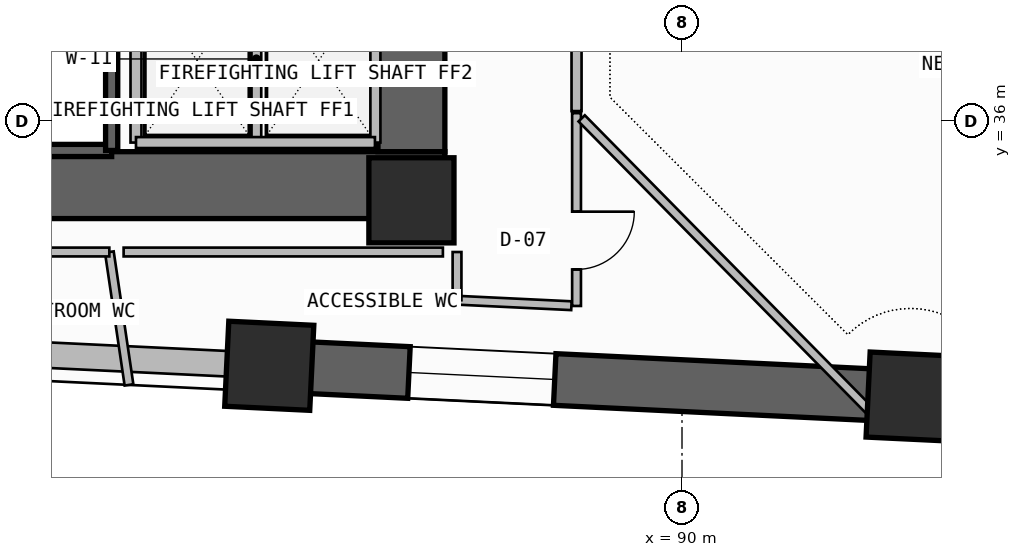
"""IFC4 building model, lengths in metres.
Left out: names, types, materials, properties, quantities, classifications, styles, units other than length and angle.
Written with IfcOpenShell. Run it as: python <this file> out.ifc"""

import sys

from ifc_helpers import new_model, si_unit, direction, frame, frame_2d, origin, origin_2d, place, context, subcontext, project, spatial, rectangle, extrude, element, fill, save


model = new_model("IFC4")
c1 = context("Model", 3, precision=1e-05, world=origin(), true_north=direction((0.0, 1.0)))
c2 = subcontext(c1, "Body", "Model", "MODEL_VIEW")
j1 = project(units=[si_unit("LENGTHUNIT", "METRE"), si_unit("PLANEANGLEUNIT", "RADIAN")], contexts=[c1])
p1 = place(None, origin())
s1 = spatial("IfcSite", under=j1, at=p1, CompositionType="ELEMENT")
p2 = place(p1, origin())
s2 = spatial("IfcBuilding", under=s1, at=p2, CompositionType="ELEMENT")
p3 = place(p2, frame((0.0, 0.0, 33.9)))
s3 = spatial("IfcBuildingStorey", under=s2, at=p3, CompositionType="ELEMENT", Elevation=33.9)
p4 = place(p3, frame((71.8, 34.95, -0.2), z_axis=(0.0, 0.0, 1.0), x_axis=(1.0, 0.0, 0.0)))
e1 = element("IfcWall", 1, at=p4, inside=s3, PredefinedType="SHEAR", context=c2, shape_type="SweptSolid", body=[
    extrude(rectangle(XDim=14.3, YDim=1.1, at=frame_2d((7.15, 0.0))), origin(), (0.0, 0.0, 1.0), 3.54),
])
p5 = place(p3, frame((85.55, 35.5, -0.2), z_axis=(0.0, 0.0, 1.0), x_axis=(0.0, 1.0, 0.0)))
e2 = element("IfcWall", 2, at=p5, inside=s3, PredefinedType="SHEAR", context=c2, shape_type="SweptSolid", body=[
    extrude(rectangle(XDim=3.3, YDim=1.1, at=frame_2d((1.65, 0.0))), origin(), (0.0, 0.0, 1.0), 3.54),
])
for number, where, z_axis, x_axis in (
    (3, (85.55, 34.7, 0.0), (0.0, 0.0, 1.0), (1.0, 0.0, 0.0)),
    (4, (83.212, 31.979, 0.0), (0.0, 0.0, 1.0), (-0.999, 0.048, 0.0)),
    (5, (93.76, 31.472, 0.0), (0.0, 0.0, 1.0), (-0.999, 0.048, 0.0)),
):
    element("IfcColumn", number, at=place(p3, frame(where, z_axis=z_axis, x_axis=x_axis)), inside=s3, PredefinedType="COLUMN", context=c2, shape_type="SweptSolid", body=[
        extrude(rectangle(XDim=1.4, YDim=1.4, at=origin_2d()), origin(), (0.0, 0.0, 1.0), 3.6),
    ])
p6 = place(p3, frame((65.281, 32.841, 0.0), z_axis=(0.0, 0.0, 1.0), x_axis=(0.998848298084, -0.047979968897, 0.0)))
e6 = element("IfcWall", 6, at=p6, inside=s3, PredefinedType="SOLIDWALL", context=c2, shape_type="SweptSolid", body=[
    extrude(rectangle(XDim=17.952, YDim=0.42, at=frame_2d((8.976, 0.0))), origin(), (0.0, 0.0, 1.0), 2.325),
])
p7 = place(p6, frame((0.9, 0.0, 1.2)))
e7 = element("IfcOpeningElement", 7, at=p7, cuts=e6, PredefinedType="OPENING", context=c2, shape_type="SweptSolid", body=[
    extrude(rectangle(XDim=2.4, YDim=0.9, at=frame_2d((1.2, 0.45))), frame((0.0, 0.22, 0.0), z_axis=(0.0, -1.0, 0.0), x_axis=(1.0, 0.0, 0.0)), (0.0, 0.0, 1.0), 0.44),
])
p8 = place(p3, frame((83.212, 31.979, -0.2), z_axis=(0.0, 0.0, 1.0), x_axis=(0.998848235141, -0.047981279227, 0.0)))
e8 = element("IfcWall", 8, at=p8, inside=s3, PredefinedType="SHEAR", context=c2, shape_type="SweptSolid", body=[
    extrude(rectangle(XDim=27.456, YDim=0.85, at=frame_2d((13.728, 0.0))), origin(), (0.0, 0.0, 1.0), 3.54),
])
p9 = place(p8, frame((2.3, 0.0, 1.2)))
e9 = element("IfcOpeningElement", 9, at=p9, cuts=e8, PredefinedType="OPENING", context=c2, shape_type="SweptSolid", body=[
    extrude(rectangle(XDim=2.4, YDim=0.9, at=frame_2d((1.2, 0.45))), frame((0.0, 0.435, 0.0), z_axis=(0.0, -1.0, 0.0), x_axis=(1.0, 0.0, 0.0)), (0.0, 0.0, 1.0), 0.87),
])
p10 = place(p3, frame((72.92, 35.52, -0.2), z_axis=(0.0, 0.0, 1.0), x_axis=(1.0, 0.0, 0.0)))
e10 = element("IfcWall", 10, at=p10, inside=s3, PredefinedType="SOLIDWALL", context=c2, shape_type="SweptSolid", body=[
    extrude(rectangle(XDim=7.7, YDim=0.2, at=frame_2d((3.85, 0.0))), origin(), (0.0, 0.0, 1.0), 3.54),
])
p11 = place(p3, frame((80.62, 35.52, -0.2), z_axis=(0.0, 0.0, 1.0), x_axis=(0.0, 1.0, 0.0)))
e11 = element("IfcWall", 11, at=p11, inside=s3, PredefinedType="SOLIDWALL", context=c2, shape_type="SweptSolid", body=[
    extrude(rectangle(XDim=3.155, YDim=0.2, at=frame_2d((1.578, 0.0))), origin(), (0.0, 0.0, 1.0), 3.54),
])
p12 = place(p3, frame((83.0, 35.65, 0.0), z_axis=(0.0, 0.0, 1.0), x_axis=(0.0, 1.0, 0.0)))
e12 = element("IfcWall", 12, at=p12, inside=s3, PredefinedType="PLUMBINGWALL", context=c2, shape_type="SweptSolid", body=[
    extrude(rectangle(XDim=2.75, YDim=0.16, at=frame_2d((1.375, 0.0))), origin(), (0.0, 0.0, 1.0), 3.34),
])
for number, where, z_axis, x_axis in (
    (13, (84.95, 35.65, 0.0), (0.0, 0.0, 1.0), (0.0, 1.0, 0.0)),
    (14, (81.02, 35.65, 0.0), (0.0, 0.0, 1.0), (0.0, 1.0, 0.0)),
):
    element("IfcWall", number, at=place(p3, frame(where, z_axis=z_axis, x_axis=x_axis)), inside=s3, PredefinedType="SOLIDWALL", context=c2, shape_type="SweptSolid", body=[
        extrude(rectangle(XDim=3.1, YDim=0.18, at=frame_2d((1.55, 0.0))), origin(), (0.0, 0.0, 1.0), 3.34),
    ])
p13 = place(p3, frame((81.02, 35.65, 0.0), z_axis=(0.0, 0.0, 1.0), x_axis=(1.0, 0.0, 0.0)))
e15 = element("IfcWall", 15, at=p13, inside=s3, PredefinedType="SOLIDWALL", context=c2, shape_type="SweptSolid", body=[
    extrude(rectangle(XDim=3.93, YDim=0.18, at=frame_2d((1.965, 0.0))), origin(), (0.0, 0.0, 1.0), 3.34),
])
p14 = place(p3, frame((80.582, 33.85, 0.0), z_axis=(0.0, 0.0, 1.0), x_axis=(0.146308364434, -0.989239032033, 0.0)))
e16 = element("IfcWall", 16, at=p14, inside=s3, PredefinedType="PARTITIONING", context=c2, shape_type="SweptSolid", body=[
    extrude(rectangle(XDim=2.209, YDim=0.145, at=frame_2d((1.104, 0.0))), origin(), (0.0, 0.0, 1.0), 3.34),
])
p15 = place(p3, frame((88.266, 32.963, 0.0), z_axis=(0.0, 0.0, 1.0), x_axis=(0.0, 1.0, 0.0)))
e17 = element("IfcWall", 17, at=p15, inside=s3, PredefinedType="PARTITIONING", context=c2, shape_type="SweptSolid", body=[
    extrude(rectangle(XDim=3.171, YDim=0.145, at=frame_2d((1.585, 0.0))), origin(), (0.0, 0.0, 1.0), 2.725),
])
p16 = place(p15, frame((0.601, 0.0, 0.0)))
e18 = element("IfcOpeningElement", 18, at=p16, cuts=e17, PredefinedType="OPENING", context=c2, shape_type="SweptSolid", body=[
    extrude(rectangle(XDim=0.95, YDim=2.15, at=frame_2d((0.475, 1.075))), frame((0.0, 0.083, 0.0), z_axis=(0.0, -1.0, 0.0), x_axis=(1.0, 0.0, 0.0)), (0.0, 0.0, 1.0), 0.165),
])
p17 = place(p3, frame((86.3, 33.057, 0.0), z_axis=(0.0, 0.0, 1.0), x_axis=(0.998848993308, -0.047965493514, 0.0)))
e19 = element("IfcWall", 19, at=p17, inside=s3, PredefinedType="PARTITIONING", context=c2, shape_type="SweptSolid", body=[
    extrude(rectangle(XDim=1.883, YDim=0.145, at=frame_2d((0.942, 0.0))), origin(), (0.0, 0.0, 1.0), 3.34),
])
p18 = place(p3, frame((86.3, 33.85, 0.0), z_axis=(0.0, 0.0, 1.0), x_axis=(0.0, -1.0, 0.0)))
e20 = element("IfcWall", 20, at=p18, inside=s3, PredefinedType="PARTITIONING", context=c2, shape_type="SweptSolid", body=[
    extrude(rectangle(XDim=0.793, YDim=0.145, at=frame_2d((0.396, 0.0))), origin(), (0.0, 0.0, 1.0), 2.875),
])
p19 = place(p3, frame((88.35, 36.048, 0.0), z_axis=(0.0, 0.0, 1.0), x_axis=(0.701810322679, -0.712363861366, 0.0)))
e21 = element("IfcWall", 21, at=p19, inside=s3, PredefinedType="PARTITIONING", context=c2, shape_type="SweptSolid", body=[
    extrude(rectangle(XDim=6.986, YDim=0.145, at=frame_2d((3.493, 0.0))), origin(), (0.0, 0.0, 1.0), 2.325),
])
p20 = place(p3, frame((88.266, 36.168, 0.0), z_axis=(0.0, 0.0, 1.0), x_axis=(0.0, 1.0, 0.0)))
e22 = element("IfcWall", 22, at=p20, inside=s3, PredefinedType="PARTITIONING", context=c2, shape_type="SweptSolid", body=[
    extrude(rectangle(XDim=7.963, YDim=0.165, at=frame_2d((3.982, 0.0))), origin(), (0.0, 0.0, 1.0), 2.725),
])
p21 = place(p20, frame((4.466, 0.0, 0.0)))
e23 = element("IfcOpeningElement", 23, at=p21, cuts=e22, PredefinedType="OPENING", context=c2, shape_type="SweptSolid", body=[
    extrude(rectangle(XDim=1.0, YDim=2.2, at=frame_2d((0.5, 1.1))), frame((0.0, 0.093, 0.0), z_axis=(0.0, -1.0, 0.0), x_axis=(1.0, 0.0, 0.0)), (0.0, 0.0, 1.0), 0.185),
])
p22 = place(p3, frame((71.31, 33.85, 0.0), z_axis=(0.0, 0.0, 1.0), x_axis=(1.0, 0.0, 0.0)))
e24 = element("IfcWall", 24, at=p22, inside=s3, PredefinedType="PARTITIONING", context=c2, shape_type="SweptSolid", body=[
    extrude(rectangle(XDim=9.272, YDim=0.145, at=frame_2d((4.636, 0.0))), origin(), (0.0, 0.0, 1.0), 3.34),
])
p23 = place(p3, frame((80.817, 33.85, 0.0), z_axis=(0.0, 0.0, 1.0), x_axis=(1.0, 0.0, 0.0)))
e25 = element("IfcWall", 25, at=p23, inside=s3, PredefinedType="PARTITIONING", context=c2, shape_type="SweptSolid", body=[
    extrude(rectangle(XDim=5.251, YDim=0.145, at=frame_2d((2.625, 0.0))), origin(), (0.0, 0.0, 1.0), 2.725),
])
p24 = place(p9, origin())
e26 = element("IfcWindow", 26, at=p24, inside=s3, PartitioningType="SINGLE_PANEL", PredefinedType="WINDOW", context=c2, shape_type="SweptSolid", body=[
    extrude(rectangle(XDim=2.4, YDim=0.9, at=frame_2d((1.2, 0.45))), frame((0.0, 0.03, 0.0), z_axis=(0.0, -1.0, 0.0), x_axis=(1.0, 0.0, 0.0)), (0.0, 0.0, 1.0), 0.06),
])
fill(e9, e26)
p25 = place(p16, frame((0.95, 0.0, 0.0), z_axis=(0.0, 0.0, 1.0), x_axis=(-1.0, 0.0, 0.0)))
e27 = element("IfcDoor", 27, at=p25, inside=s3, OperationType="SINGLE_SWING_LEFT", PredefinedType="DOOR", context=c2, shape_type="SweptSolid", body=[
    extrude(rectangle(XDim=0.95, YDim=2.15, at=frame_2d((0.475, 1.075))), frame((0.0, 0.025, 0.0), z_axis=(0.0, -1.0, 0.0), x_axis=(1.0, 0.0, 0.0)), (0.0, 0.0, 1.0), 0.05),
])
fill(e18, e27)
save(model, sys.argv[1])
